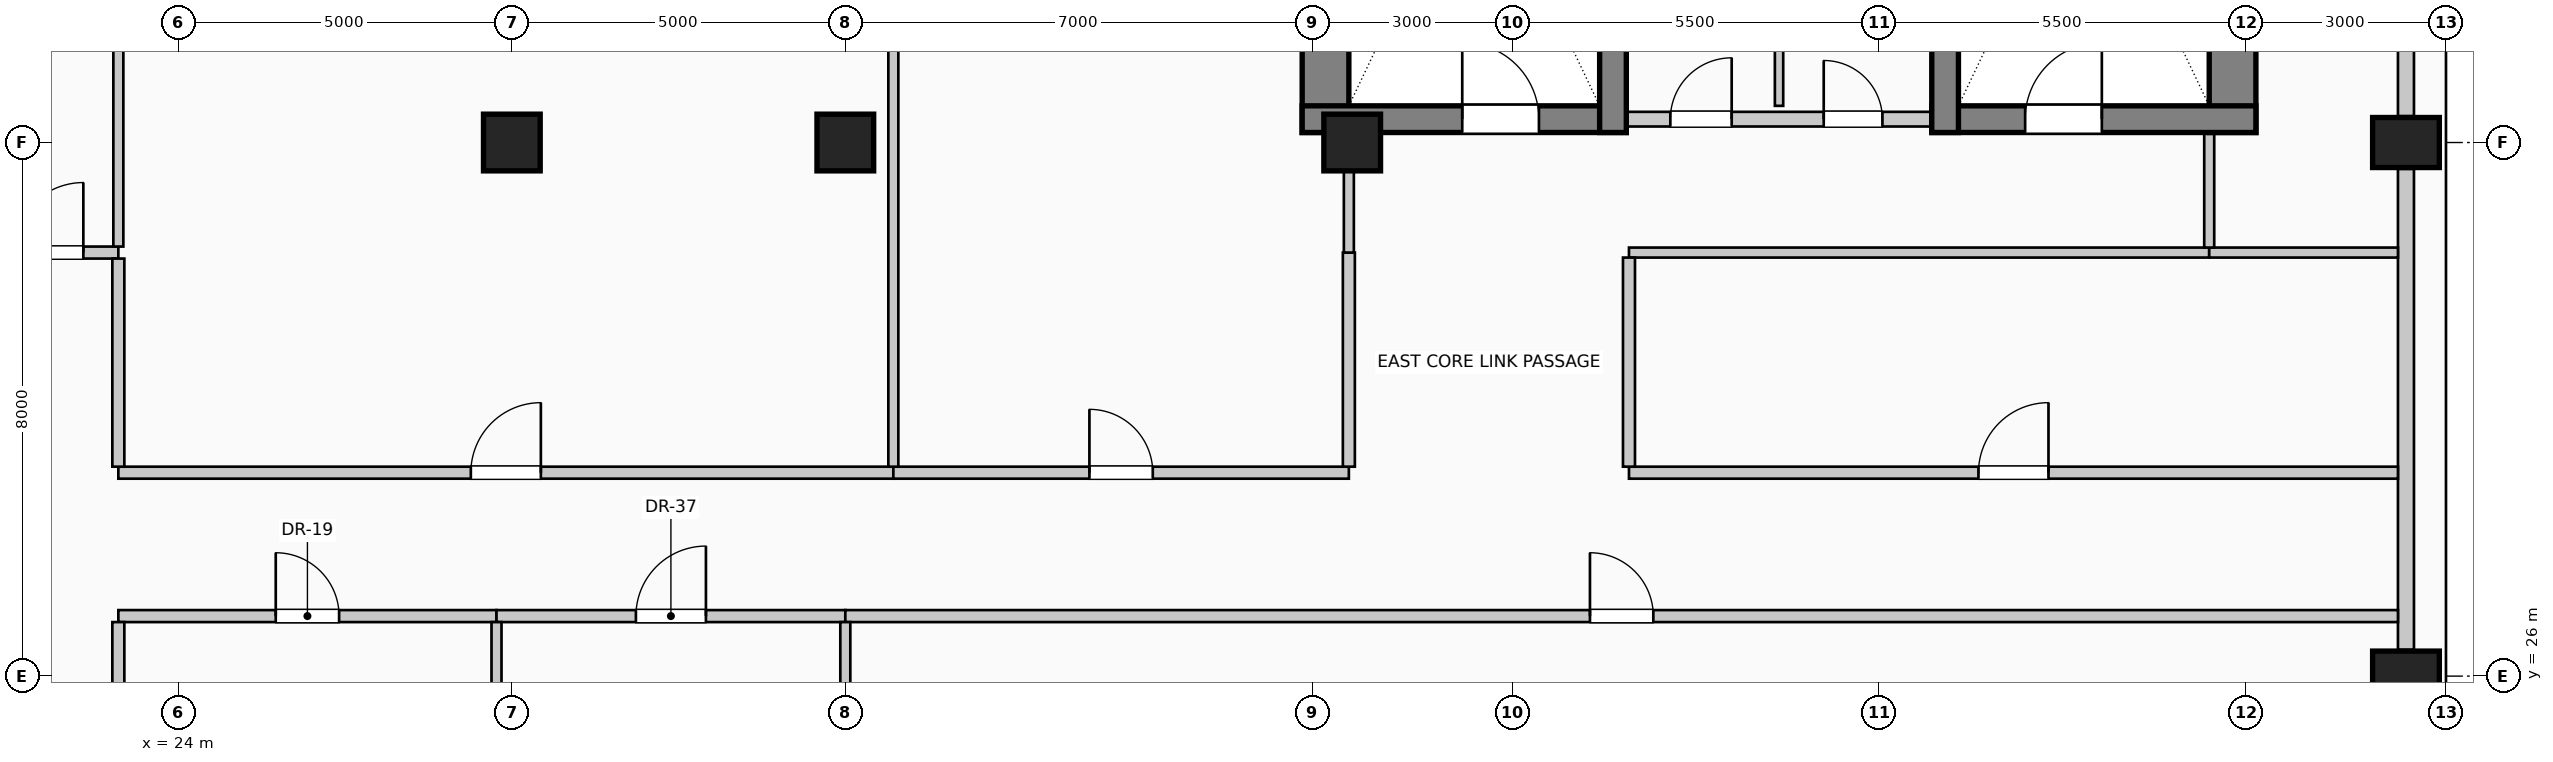
"""IFC4 building model, lengths in metres.
Left out: names, types, materials, properties, quantities, classifications, styles, units other than length and angle.
Written with IfcOpenShell. Run it as: python <this file> out.ifc"""

import sys

from ifc_helpers import new_model, si_unit, direction, frame, frame_2d, origin, origin_2d, place, context, subcontext, project, spatial, rectangle, circle, extrude, element, fill, save


model = new_model("IFC4")
c1 = context("Model", 3, precision=1e-05, world=origin(), true_north=direction((0.0, 1.0)))
c2 = subcontext(c1, "Body", "Model", "MODEL_VIEW")
j1 = project(units=[si_unit("LENGTHUNIT", "METRE"), si_unit("PLANEANGLEUNIT", "RADIAN")], contexts=[c1])
p1 = place(None, origin())
s1 = spatial("IfcSite", under=j1, at=p1, CompositionType="ELEMENT")
p2 = place(p1, origin())
s2 = spatial("IfcBuilding", under=s1, at=p2, CompositionType="ELEMENT")
p3 = place(p2, frame((0.0, 0.0, 234.6)))
s3 = spatial("IfcBuildingStorey", under=s2, at=p3, CompositionType="ELEMENT", Elevation=234.6)
for number, where, z_axis, x_axis in (
    (1, (41.2, 34.15, 0.0), (0.0, 0.0, 1.0), (0.0, 1.0, 0.0)),
    (2, (54.8, 34.15, 0.0), (0.0, 0.0, 1.0), (0.0, 1.0, 0.0)),
):
    element("IfcWall", number, at=place(p3, frame(where, z_axis=z_axis, x_axis=x_axis)), inside=s3, PredefinedType="SHEAR", context=c2, shape_type="SweptSolid", body=[
        extrude(rectangle(XDim=8.98, YDim=0.7, at=frame_2d((4.49, 0.0))), origin(), (0.0, 0.0, 1.0), 4.0),
    ])
p4 = place(p3, frame((40.85, 34.35, 0.0), z_axis=(0.0, 0.0, 1.0), x_axis=(1.0, 0.0, 0.0)))
e3 = element("IfcWall", 3, at=p4, inside=s3, PredefinedType="SHEAR", context=c2, shape_type="SweptSolid", body=[
    extrude(rectangle(XDim=4.86, YDim=0.4, at=frame_2d((2.43, 0.0))), origin(), (0.0, 0.0, 1.0), 4.0),
])
p5 = place(p4, frame((2.4, 0.0, 0.0)))
e4 = element("IfcOpeningElement", 4, at=p5, cuts=e3, PredefinedType="OPENING", context=c2, shape_type="SweptSolid", body=[
    extrude(rectangle(XDim=1.15, YDim=2.2, at=frame_2d((0.575, 1.1))), frame((0.0, 0.21, 0.0), z_axis=(0.0, -1.0, 0.0), x_axis=(1.0, 0.0, 0.0)), (0.0, 0.0, 1.0), 0.42),
])
p6 = place(p3, frame((45.51, 34.15, 0.0), z_axis=(0.0, 0.0, 1.0), x_axis=(0.0, 1.0, 0.0)))
e5 = element("IfcWall", 5, at=p6, inside=s3, PredefinedType="SHEAR", context=c2, shape_type="SweptSolid", body=[
    extrude(rectangle(XDim=8.98, YDim=0.4, at=frame_2d((4.49, 0.0))), origin(), (0.0, 0.0, 1.0), 4.0),
])
p7 = place(p3, frame((50.29, 34.35, 0.0), z_axis=(0.0, 0.0, 1.0), x_axis=(1.0, 0.0, 0.0)))
e6 = element("IfcWall", 6, at=p7, inside=s3, PredefinedType="SHEAR", context=c2, shape_type="SweptSolid", body=[
    extrude(rectangle(XDim=4.86, YDim=0.4, at=frame_2d((2.43, 0.0))), origin(), (0.0, 0.0, 1.0), 4.0),
])
p8 = place(p7, frame((1.4, 0.0, 0.0)))
e7 = element("IfcOpeningElement", 7, at=p8, cuts=e6, PredefinedType="OPENING", context=c2, shape_type="SweptSolid", body=[
    extrude(rectangle(XDim=1.15, YDim=2.2, at=frame_2d((0.575, 1.1))), frame((0.0, 0.21, 0.0), z_axis=(0.0, -1.0, 0.0), x_axis=(1.0, 0.0, 0.0)), (0.0, 0.0, 1.0), 0.42),
])
p9 = place(p3, frame((50.49, 34.15, 0.0), z_axis=(0.0, 0.0, 1.0), x_axis=(0.0, 1.0, 0.0)))
e8 = element("IfcWall", 8, at=p9, inside=s3, PredefinedType="SHEAR", context=c2, shape_type="SweptSolid", body=[
    extrude(rectangle(XDim=8.98, YDim=0.4, at=frame_2d((4.49, 0.0))), origin(), (0.0, 0.0, 1.0), 4.0),
])
for number, where, z_axis, x_axis in (
    (9, (57.4, 26.0, 0.0), (0.0, 0.0, 1.0), (0.0, 1.0, 0.0)),
    (10, (57.4, 34.0, 0.0), (0.0, 0.0, 1.0), (0.0, 1.0, 0.0)),
):
    element("IfcColumn", number, at=place(p3, frame(where, z_axis=z_axis, x_axis=x_axis)), inside=s3, PredefinedType="COLUMN", context=c2, shape_type="SweptSolid", body=[
        extrude(rectangle(XDim=0.75, YDim=1.0, at=origin_2d()), origin(), (0.0, 0.0, 1.0), 4.0),
    ])
for number, where, z_axis, x_axis in (
    (11, (29.0, 34.0, 0.0), (0.0, 0.0, 1.0), (1.0, 0.0, 0.0)),
    (12, (41.6, 34.0, 0.0), (0.0, 0.0, 1.0), (1.0, 0.0, 0.0)),
    (13, (34.0, 34.0, 0.0), (0.0, 0.0, 1.0), (1.0, 0.0, 0.0)),
):
    element("IfcColumn", number, at=place(p3, frame(where, z_axis=z_axis, x_axis=x_axis)), inside=s3, PredefinedType="COLUMN", context=c2, shape_type="SweptSolid", body=[
        extrude(circle(Radius=0.425, at=origin_2d()), origin(), (0.0, 0.0, 1.0), 4.0),
    ])
p10 = place(p3, frame((57.4, 33.605, 0.0), z_axis=(0.0, 0.0, 1.0), x_axis=(0.0, -1.0, 0.0)))
e14 = element("IfcWall", 14, at=p10, inside=s3, PredefinedType="SOLIDWALL", context=c2, shape_type="SweptSolid", body=[
    extrude(rectangle(XDim=7.21, YDim=0.24, at=frame_2d((3.605, 0.0))), origin(), (0.0, 0.0, 1.0), 2.91),
])
p11 = place(p3, frame((57.4, 42.005, 0.0), z_axis=(0.0, 0.0, 1.0), x_axis=(0.0, -1.0, 0.0)))
e15 = element("IfcWall", 15, at=p11, inside=s3, PredefinedType="SOLIDWALL", context=c2, shape_type="SweptSolid", body=[
    extrude(rectangle(XDim=7.61, YDim=0.24, at=frame_2d((3.805, 0.0))), origin(), (0.0, 0.0, 1.0), 2.91),
])
p12 = place(p3, frame((45.72, 34.35, 0.0), z_axis=(0.0, 0.0, 1.0), x_axis=(1.0, 0.0, 0.0)))
e16 = element("IfcWall", 16, at=p12, inside=s3, PredefinedType="PARTITIONING", context=c2, shape_type="SweptSolid", body=[
    extrude(rectangle(XDim=4.56, YDim=0.22, at=frame_2d((2.28, 0.0))), origin(), (0.0, 0.0, 1.0), 3.66),
])
p13 = place(p12, frame((0.65, 0.0, 0.0)))
e17 = element("IfcOpeningElement", 17, at=p13, cuts=e16, PredefinedType="OPENING", context=c2, shape_type="SweptSolid", body=[
    extrude(rectangle(XDim=0.92, YDim=2.1, at=frame_2d((0.46, 1.05))), frame((0.0, 0.12, 0.0), z_axis=(0.0, -1.0, 0.0), x_axis=(1.0, 0.0, 0.0)), (0.0, 0.0, 1.0), 0.24),
])
p14 = place(p12, frame((2.95, 0.0, 0.0)))
e18 = element("IfcOpeningElement", 18, at=p14, cuts=e16, PredefinedType="OPENING", context=c2, shape_type="SweptSolid", body=[
    extrude(rectangle(XDim=0.88, YDim=2.1, at=frame_2d((0.44, 1.05))), frame((0.0, 0.12, 0.0), z_axis=(0.0, -1.0, 0.0), x_axis=(1.0, 0.0, 0.0)), (0.0, 0.0, 1.0), 0.24),
])
p15 = place(p3, frame((23.1, 26.9, 0.0), z_axis=(0.0, 0.0, 1.0), x_axis=(1.0, 0.0, 0.0)))
e19 = element("IfcWall", 19, at=p15, inside=s3, PredefinedType="PARTITIONING", context=c2, shape_type="SweptSolid", body=[
    extrude(rectangle(XDim=5.67, YDim=0.18, at=frame_2d((2.835, 0.0))), origin(), (0.0, 0.0, 1.0), 3.66),
])
p16 = place(p15, frame((2.36, 0.0, 0.0)))
e20 = element("IfcOpeningElement", 20, at=p16, cuts=e19, PredefinedType="OPENING", context=c2, shape_type="SweptSolid", body=[
    extrude(rectangle(XDim=0.95, YDim=2.15, at=frame_2d((0.475, 1.075))), frame((0.0, 0.1, 0.0), z_axis=(0.0, -1.0, 0.0), x_axis=(1.0, 0.0, 0.0)), (0.0, 0.0, 1.0), 0.2),
])
p17 = place(p3, frame((28.77, 26.9, 0.0), z_axis=(0.0, 0.0, 1.0), x_axis=(1.0, 0.0, 0.0)))
e21 = element("IfcWall", 21, at=p17, inside=s3, PredefinedType="PARTITIONING", context=c2, shape_type="SweptSolid", body=[
    extrude(rectangle(XDim=5.23, YDim=0.18, at=frame_2d((2.615, 0.0))), origin(), (0.0, 0.0, 1.0), 3.66),
])
p18 = place(p17, frame((2.09, 0.0, 0.0)))
e22 = element("IfcOpeningElement", 22, at=p18, cuts=e21, PredefinedType="OPENING", context=c2, shape_type="SweptSolid", body=[
    extrude(rectangle(XDim=1.05, YDim=2.15, at=frame_2d((0.525, 1.075))), frame((0.0, 0.1, 0.0), z_axis=(0.0, -1.0, 0.0), x_axis=(1.0, 0.0, 0.0)), (0.0, 0.0, 1.0), 0.2),
])
p19 = place(p3, frame((34.0, 26.9, 0.0), z_axis=(0.0, 0.0, 1.0), x_axis=(1.0, 0.0, 0.0)))
e23 = element("IfcWall", 23, at=p19, inside=s3, PredefinedType="PARTITIONING", context=c2, shape_type="SweptSolid", body=[
    extrude(rectangle(XDim=23.28, YDim=0.18, at=frame_2d((11.64, 0.0))), origin(), (0.0, 0.0, 1.0), 3.66),
])
p20 = place(p19, frame((11.165, 0.0, 0.0)))
e24 = element("IfcOpeningElement", 24, at=p20, cuts=e23, PredefinedType="OPENING", context=c2, shape_type="SweptSolid", body=[
    extrude(rectangle(XDim=0.95, YDim=2.15, at=frame_2d((0.475, 1.075))), frame((0.0, 0.1, 0.0), z_axis=(0.0, -1.0, 0.0), x_axis=(1.0, 0.0, 0.0)), (0.0, 0.0, 1.0), 0.2),
])
p21 = place(p3, frame((23.1, 29.05, 0.0), z_axis=(0.0, 0.0, 1.0), x_axis=(1.0, 0.0, 0.0)))
e25 = element("IfcWall", 25, at=p21, inside=s3, PredefinedType="PARTITIONING", context=c2, shape_type="SweptSolid", body=[
    extrude(rectangle(XDim=11.62, YDim=0.18, at=frame_2d((5.81, 0.0))), origin(), (0.0, 0.0, 1.0), 3.66),
])
p22 = place(p21, frame((5.285, 0.0, 0.0)))
e26 = element("IfcOpeningElement", 26, at=p22, cuts=e25, PredefinedType="OPENING", context=c2, shape_type="SweptSolid", body=[
    extrude(rectangle(XDim=1.05, YDim=2.15, at=frame_2d((0.525, 1.075))), frame((0.0, 0.1, 0.0), z_axis=(0.0, -1.0, 0.0), x_axis=(1.0, 0.0, 0.0)), (0.0, 0.0, 1.0), 0.2),
])
p23 = place(p3, frame((34.72, 29.05, 0.0), z_axis=(0.0, 0.0, 1.0), x_axis=(1.0, 0.0, 0.0)))
e27 = element("IfcWall", 27, at=p23, inside=s3, PredefinedType="PARTITIONING", context=c2, shape_type="SweptSolid", body=[
    extrude(rectangle(XDim=6.83, YDim=0.18, at=frame_2d((3.415, 0.0))), origin(), (0.0, 0.0, 1.0), 3.66),
])
p24 = place(p23, frame((2.94, 0.0, 0.0)))
e28 = element("IfcOpeningElement", 28, at=p24, cuts=e27, PredefinedType="OPENING", context=c2, shape_type="SweptSolid", body=[
    extrude(rectangle(XDim=0.95, YDim=2.15, at=frame_2d((0.475, 1.075))), frame((0.0, 0.1, 0.0), z_axis=(0.0, -1.0, 0.0), x_axis=(1.0, 0.0, 0.0)), (0.0, 0.0, 1.0), 0.2),
])
p25 = place(p3, frame((45.75, 29.05, 0.0), z_axis=(0.0, 0.0, 1.0), x_axis=(1.0, 0.0, 0.0)))
e29 = element("IfcWall", 29, at=p25, inside=s3, PredefinedType="PARTITIONING", context=c2, shape_type="SweptSolid", body=[
    extrude(rectangle(XDim=11.53, YDim=0.18, at=frame_2d((5.765, 0.0))), origin(), (0.0, 0.0, 1.0), 3.66),
])
p26 = place(p25, frame((5.24, 0.0, 0.0)))
e30 = element("IfcOpeningElement", 30, at=p26, cuts=e29, PredefinedType="OPENING", context=c2, shape_type="SweptSolid", body=[
    extrude(rectangle(XDim=1.05, YDim=2.15, at=frame_2d((0.525, 1.075))), frame((0.0, 0.1, 0.0), z_axis=(0.0, -1.0, 0.0), x_axis=(1.0, 0.0, 0.0)), (0.0, 0.0, 1.0), 0.2),
])
p27 = place(p3, frame((21.0, 32.35, 0.0), z_axis=(0.0, 0.0, 1.0), x_axis=(1.0, 0.0, 0.0)))
e31 = element("IfcWall", 31, at=p27, inside=s3, PredefinedType="PARTITIONING", context=c2, shape_type="SweptSolid", body=[
    extrude(rectangle(XDim=2.1, YDim=0.18, at=frame_2d((1.05, 0.0))), origin(), (0.0, 0.0, 1.0), 3.66),
])
p28 = place(p27, frame((0.525, 0.0, 0.0)))
e32 = element("IfcOpeningElement", 32, at=p28, cuts=e31, PredefinedType="OPENING", context=c2, shape_type="SweptSolid", body=[
    extrude(rectangle(XDim=1.05, YDim=2.15, at=frame_2d((0.525, 1.075))), frame((0.0, 0.1, 0.0), z_axis=(0.0, -1.0, 0.0), x_axis=(1.0, 0.0, 0.0)), (0.0, 0.0, 1.0), 0.2),
])
p29 = place(p3, frame((45.75, 32.35, 0.0), z_axis=(0.0, 0.0, 1.0), x_axis=(1.0, 0.0, 0.0)))
e33 = element("IfcWall", 33, at=p29, inside=s3, PredefinedType="PARTITIONING", context=c2, shape_type="SweptSolid", body=[
    extrude(rectangle(XDim=8.7, YDim=0.15, at=frame_2d((4.35, 0.0))), origin(), (0.0, 0.0, 1.0), 3.66),
])
p30 = place(p3, frame((54.45, 32.35, 0.0), z_axis=(0.0, 0.0, 1.0), x_axis=(1.0, 0.0, 0.0)))
e34 = element("IfcWall", 34, at=p30, inside=s3, PredefinedType="PARTITIONING", context=c2, shape_type="SweptSolid", body=[
    extrude(rectangle(XDim=2.83, YDim=0.15, at=frame_2d((1.415, 0.0))), origin(), (0.0, 0.0, 1.0), 3.66),
])
p31 = place(p3, frame((23.1, 17.3, 0.0), z_axis=(0.0, 0.0, 1.0), x_axis=(0.0, 1.0, 0.0)))
e35 = element("IfcWall", 35, at=p31, inside=s3, PredefinedType="PARTITIONING", context=c2, shape_type="SweptSolid", body=[
    extrude(rectangle(XDim=9.51, YDim=0.18, at=frame_2d((4.755, 0.0))), origin(), (0.0, 0.0, 1.0), 3.66),
])
p32 = place(p3, frame((23.1, 29.14, 0.0), z_axis=(0.0, 0.0, 1.0), x_axis=(0.0, 1.0, 0.0)))
e36 = element("IfcWall", 36, at=p32, inside=s3, PredefinedType="PARTITIONING", context=c2, shape_type="SweptSolid", body=[
    extrude(rectangle(XDim=3.12, YDim=0.18, at=frame_2d((1.56, 0.0))), origin(), (0.0, 0.0, 1.0), 3.66),
])
p33 = place(p3, frame((23.1, 32.44, 0.0), z_axis=(0.0, 0.0, 1.0), x_axis=(0.0, 1.0, 0.0)))
e37 = element("IfcWall", 37, at=p33, inside=s3, PredefinedType="PARTITIONING", context=c2, shape_type="SweptSolid", body=[
    extrude(rectangle(XDim=12.84, YDim=0.15, at=frame_2d((6.42, 0.0))), origin(), (0.0, 0.0, 1.0), 3.66),
])
for number, where, z_axis, x_axis in (
    (38, (28.77, 18.425, 0.0), (0.0, 0.0, 1.0), (0.0, 1.0, 0.0)),
    (39, (34.0, 18.425, 0.0), (0.0, 0.0, 1.0), (0.0, 1.0, 0.0)),
):
    element("IfcWall", number, at=place(p3, frame(where, z_axis=z_axis, x_axis=x_axis)), inside=s3, PredefinedType="PARTITIONING", context=c2, shape_type="SweptSolid", body=[
        extrude(rectangle(XDim=8.385, YDim=0.15, at=frame_2d((4.192, 0.0))), origin(), (0.0, 0.0, 1.0), 3.055),
    ])
p34 = place(p3, frame((34.72, 29.14, 0.0), z_axis=(0.0, 0.0, 1.0), x_axis=(0.0, 1.0, 0.0)))
e40 = element("IfcWall", 40, at=p34, inside=s3, PredefinedType="PARTITIONING", context=c2, shape_type="SweptSolid", body=[
    extrude(rectangle(XDim=16.14, YDim=0.15, at=frame_2d((8.07, 0.0))), origin(), (0.0, 0.0, 1.0), 3.66),
])
p35 = place(p3, frame((41.55, 29.14, 0.0), z_axis=(0.0, 0.0, 1.0), x_axis=(0.0, 1.0, 0.0)))
e41 = element("IfcWall", 41, at=p35, inside=s3, PredefinedType="PARTITIONING", context=c2, shape_type="SweptSolid", body=[
    extrude(rectangle(XDim=3.21, YDim=0.18, at=frame_2d((1.605, 0.0))), origin(), (0.0, 0.0, 1.0), 3.055),
])
p36 = place(p3, frame((41.55, 32.35, 0.0), z_axis=(0.0, 0.0, 1.0), x_axis=(0.0, 1.0, 0.0)))
e42 = element("IfcWall", 42, at=p36, inside=s3, PredefinedType="PARTITIONING", context=c2, shape_type="SweptSolid", body=[
    extrude(rectangle(XDim=1.225, YDim=0.15, at=frame_2d((0.612, 0.0))), origin(), (0.0, 0.0, 1.0), 3.055),
])
p37 = place(p3, frame((45.75, 29.14, 0.0), z_axis=(0.0, 0.0, 1.0), x_axis=(0.0, 1.0, 0.0)))
e43 = element("IfcWall", 43, at=p37, inside=s3, PredefinedType="PARTITIONING", context=c2, shape_type="SweptSolid", body=[
    extrude(rectangle(XDim=3.135, YDim=0.18, at=frame_2d((1.567, 0.0))), origin(), (0.0, 0.0, 1.0), 3.66),
])
p38 = place(p3, frame((48.0, 34.55, 0.0), z_axis=(0.0, 0.0, 1.0), x_axis=(0.0, 1.0, 0.0)))
e44 = element("IfcWall", 44, at=p38, inside=s3, PredefinedType="PARTITIONING", context=c2, shape_type="SweptSolid", body=[
    extrude(rectangle(XDim=7.475, YDim=0.125, at=frame_2d((3.737, 0.0))), origin(), (0.0, 0.0, 1.0), 3.66),
])
p39 = place(p3, frame((54.45, 32.425, 0.0), z_axis=(0.0, 0.0, 1.0), x_axis=(0.0, 1.0, 0.0)))
e45 = element("IfcWall", 45, at=p39, inside=s3, PredefinedType="PARTITIONING", context=c2, shape_type="SweptSolid", body=[
    extrude(rectangle(XDim=1.725, YDim=0.15, at=frame_2d((0.862, 0.0))), origin(), (0.0, 0.0, 1.0), 3.66),
])
p40 = place(p5, origin())
e46 = element("IfcDoor", 46, at=p40, inside=s3, OperationType="SINGLE_SWING_LEFT", PredefinedType="DOOR", context=c2, shape_type="SweptSolid", body=[
    extrude(rectangle(XDim=1.15, YDim=2.2, at=frame_2d((0.575, 1.1))), frame((0.0, 0.025, 0.0), z_axis=(0.0, -1.0, 0.0), x_axis=(1.0, 0.0, 0.0)), (0.0, 0.0, 1.0), 0.05),
])
fill(e4, e46)
p41 = place(p13, origin())
e47 = element("IfcDoor", 47, at=p41, inside=s3, OperationType="SINGLE_SWING_RIGHT", PredefinedType="DOOR", context=c2, shape_type="SweptSolid", body=[
    extrude(rectangle(XDim=0.92, YDim=2.1, at=frame_2d((0.46, 1.05))), frame((0.0, 0.025, 0.0), z_axis=(0.0, -1.0, 0.0), x_axis=(1.0, 0.0, 0.0)), (0.0, 0.0, 1.0), 0.05),
])
fill(e17, e47)
p42 = place(p14, origin())
e48 = element("IfcDoor", 48, at=p42, inside=s3, OperationType="SINGLE_SWING_LEFT", PredefinedType="DOOR", context=c2, shape_type="SweptSolid", body=[
    extrude(rectangle(XDim=0.88, YDim=2.1, at=frame_2d((0.44, 1.05))), frame((0.0, 0.025, 0.0), z_axis=(0.0, -1.0, 0.0), x_axis=(1.0, 0.0, 0.0)), (0.0, 0.0, 1.0), 0.05),
])
fill(e18, e48)
p43 = place(p8, origin())
e49 = element("IfcDoor", 49, at=p43, inside=s3, OperationType="SINGLE_SWING_RIGHT", PredefinedType="DOOR", context=c2, shape_type="SweptSolid", body=[
    extrude(rectangle(XDim=1.15, YDim=2.2, at=frame_2d((0.575, 1.1))), frame((0.0, 0.025, 0.0), z_axis=(0.0, -1.0, 0.0), x_axis=(1.0, 0.0, 0.0)), (0.0, 0.0, 1.0), 0.05),
])
fill(e7, e49)
p44 = place(p16, origin())
e50 = element("IfcDoor", 50, at=p44, inside=s3, OperationType="SINGLE_SWING_LEFT", PredefinedType="DOOR", context=c2, shape_type="SweptSolid", body=[
    extrude(rectangle(XDim=0.95, YDim=2.15, at=frame_2d((0.475, 1.075))), frame((0.0, 0.025, 0.0), z_axis=(0.0, -1.0, 0.0), x_axis=(1.0, 0.0, 0.0)), (0.0, 0.0, 1.0), 0.05),
])
fill(e20, e50)
p45 = place(p18, origin())
e51 = element("IfcDoor", 51, at=p45, inside=s3, OperationType="SINGLE_SWING_RIGHT", PredefinedType="DOOR", context=c2, shape_type="SweptSolid", body=[
    extrude(rectangle(XDim=1.05, YDim=2.15, at=frame_2d((0.525, 1.075))), frame((0.0, 0.025, 0.0), z_axis=(0.0, -1.0, 0.0), x_axis=(1.0, 0.0, 0.0)), (0.0, 0.0, 1.0), 0.05),
])
fill(e22, e51)
p46 = place(p20, origin())
e52 = element("IfcDoor", 52, at=p46, inside=s3, OperationType="SINGLE_SWING_LEFT", PredefinedType="DOOR", context=c2, shape_type="SweptSolid", body=[
    extrude(rectangle(XDim=0.95, YDim=2.15, at=frame_2d((0.475, 1.075))), frame((0.0, 0.025, 0.0), z_axis=(0.0, -1.0, 0.0), x_axis=(1.0, 0.0, 0.0)), (0.0, 0.0, 1.0), 0.05),
])
fill(e24, e52)
p47 = place(p22, origin())
e53 = element("IfcDoor", 53, at=p47, inside=s3, OperationType="SINGLE_SWING_RIGHT", PredefinedType="DOOR", context=c2, shape_type="SweptSolid", body=[
    extrude(rectangle(XDim=1.05, YDim=2.15, at=frame_2d((0.525, 1.075))), frame((0.0, 0.025, 0.0), z_axis=(0.0, -1.0, 0.0), x_axis=(1.0, 0.0, 0.0)), (0.0, 0.0, 1.0), 0.05),
])
fill(e26, e53)
p48 = place(p24, origin())
e54 = element("IfcDoor", 54, at=p48, inside=s3, OperationType="SINGLE_SWING_LEFT", PredefinedType="DOOR", context=c2, shape_type="SweptSolid", body=[
    extrude(rectangle(XDim=0.95, YDim=2.15, at=frame_2d((0.475, 1.075))), frame((0.0, 0.025, 0.0), z_axis=(0.0, -1.0, 0.0), x_axis=(1.0, 0.0, 0.0)), (0.0, 0.0, 1.0), 0.05),
])
fill(e28, e54)
p49 = place(p26, origin())
e55 = element("IfcDoor", 55, at=p49, inside=s3, OperationType="SINGLE_SWING_RIGHT", PredefinedType="DOOR", context=c2, shape_type="SweptSolid", body=[
    extrude(rectangle(XDim=1.05, YDim=2.15, at=frame_2d((0.525, 1.075))), frame((0.0, 0.025, 0.0), z_axis=(0.0, -1.0, 0.0), x_axis=(1.0, 0.0, 0.0)), (0.0, 0.0, 1.0), 0.05),
])
fill(e30, e55)
p50 = place(p28, origin())
e56 = element("IfcDoor", 56, at=p50, inside=s3, OperationType="SINGLE_SWING_RIGHT", PredefinedType="DOOR", context=c2, shape_type="SweptSolid", body=[
    extrude(rectangle(XDim=1.05, YDim=2.15, at=frame_2d((0.525, 1.075))), frame((0.0, 0.025, 0.0), z_axis=(0.0, -1.0, 0.0), x_axis=(1.0, 0.0, 0.0)), (0.0, 0.0, 1.0), 0.05),
])
fill(e32, e56)
save(model, sys.argv[1])
